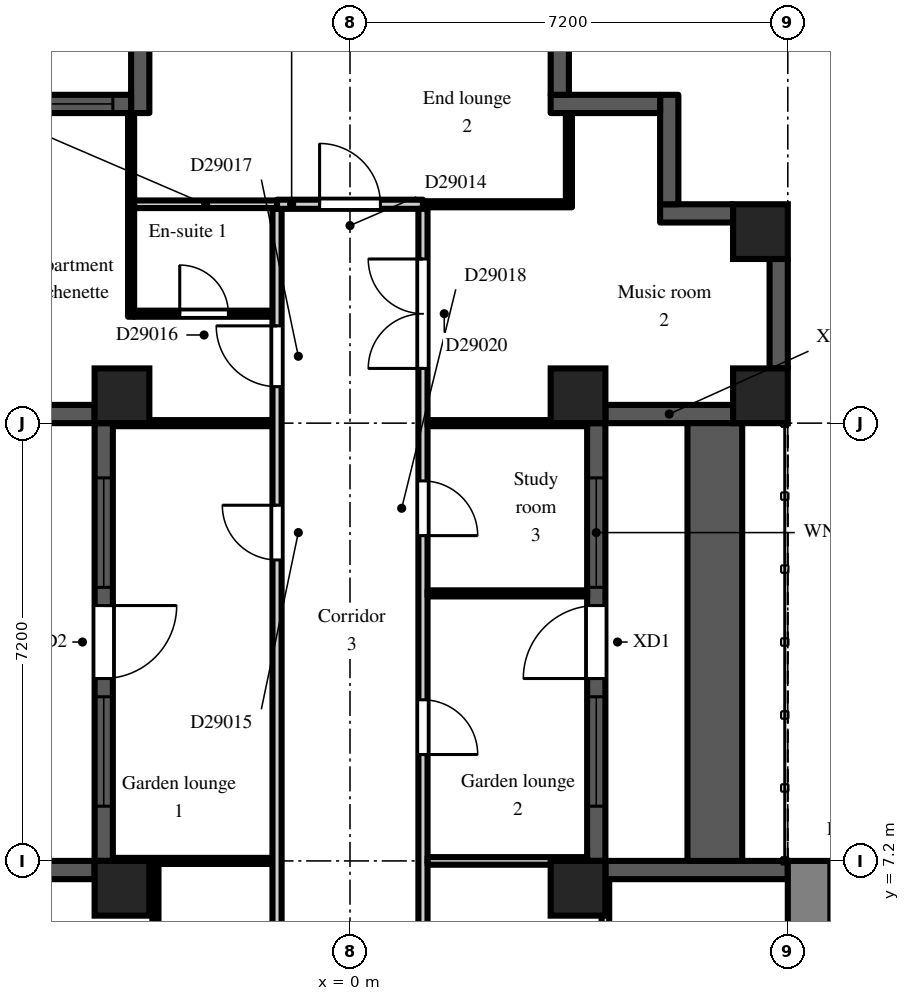
"""IFC4 building model, lengths in metres.
Left out: names, types, materials, properties, quantities, classifications, styles, units other than length and angle.
Written with IfcOpenShell. Run it as: python <this file> out.ifc"""

import sys

from ifc_helpers import new_model, si_unit, direction, frame, frame_2d, origin, origin_2d, place, context, subcontext, project, spatial, rectangle, extrude, element, fill, save


model = new_model("IFC4")
c1 = context("Model", 3, precision=1e-05, world=origin(), true_north=direction((0.0, 1.0)))
c2 = subcontext(c1, "Body", "Model", "MODEL_VIEW")
j1 = project(units=[si_unit("LENGTHUNIT", "METRE"), si_unit("PLANEANGLEUNIT", "RADIAN")], contexts=[c1])
p1 = place(None, origin())
s1 = spatial("IfcSite", under=j1, at=p1, CompositionType="ELEMENT")
p2 = place(p1, origin())
s2 = spatial("IfcBuilding", under=s1, at=p2, CompositionType="ELEMENT")
p3 = place(p2, frame((0.0, 0.0, 201.9)))
s3 = spatial("IfcBuildingStorey", under=s2, at=p3, CompositionType="ELEMENT", Elevation=201.9)
for number, where, z_axis, x_axis in (
    (1, (-3.75, 6.75, 0.0), (0.0, 0.0, 1.0), (1.0, 0.0, 0.0)),
    (2, (-3.75, 14.85, 0.0), (0.0, 0.0, 1.0), (1.0, 0.0, 0.0)),
    (3, (3.75, 6.75, 0.0), (0.0, 0.0, 1.0), (1.0, 0.0, 0.0)),
    (4, (3.75, 14.85, 0.0), (0.0, 0.0, 1.0), (1.0, 0.0, 0.0)),
    (5, (6.75, 14.85, 0.0), (0.0, 0.0, 1.0), (1.0, 0.0, 0.0)),
    (6, (6.75, 17.55, 0.0), (0.0, 0.0, 1.0), (1.0, 0.0, 0.0)),
):
    element("IfcColumn", number, at=place(p3, frame(where, z_axis=z_axis, x_axis=x_axis)), inside=s3, PredefinedType="COLUMN", context=c2, shape_type="SweptSolid", body=[
        extrude(rectangle(XDim=0.9, YDim=0.9, at=origin_2d()), origin(), (0.0, 0.0, 1.0), 3.0),
    ])
p4 = place(p3, frame((7.2, 7.05, 0.0), z_axis=(0.0, 0.0, 1.0), x_axis=(-1.0, 0.0, 0.0)))
e7 = element("IfcWall", 7, at=p4, inside=s3, PredefinedType="SOLIDWALL", context=c2, shape_type="SweptSolid", body=[
    extrude(rectangle(XDim=3.0, YDim=0.3, at=frame_2d((1.5, 0.0))), origin(), (0.0, 0.0, 1.0), 2.3),
])
p5 = place(p3, frame((4.05, 7.2, 0.0), z_axis=(0.0, 0.0, 1.0), x_axis=(0.0, 1.0, 0.0)))
e8 = element("IfcWall", 8, at=p5, inside=s3, PredefinedType="SOLIDWALL", context=c2, shape_type="SweptSolid", body=[
    extrude(rectangle(XDim=7.2, YDim=0.3, at=frame_2d((3.6, 0.0))), origin(), (0.0, 0.0, 1.0), 2.3),
])
p6 = place(p5, frame((3.0, 0.0, 0.0)))
e9 = element("IfcOpeningElement", 9, at=p6, cuts=e8, PredefinedType="OPENING", context=c2, shape_type="SweptSolid", body=[
    extrude(rectangle(XDim=1.2, YDim=2.05, at=frame_2d((0.6, 1.025))), frame((0.0, 0.16, 0.0), z_axis=(0.0, -1.0, 0.0), x_axis=(1.0, 0.0, 0.0)), (0.0, 0.0, 1.0), 0.32),
])
p7 = place(p5, frame((0.9, 0.0, 0.2)))
e10 = element("IfcOpeningElement", 10, at=p7, cuts=e8, PredefinedType="OPENING", context=c2, shape_type="SweptSolid", body=[
    extrude(rectangle(XDim=1.8, YDim=1.85, at=frame_2d((0.9, 0.925))), frame((0.0, 0.16, 0.0), z_axis=(0.0, -1.0, 0.0), x_axis=(1.0, 0.0, 0.0)), (0.0, 0.0, 1.0), 0.32),
])
p8 = place(p5, frame((4.5, 0.0, 0.2)))
e11 = element("IfcOpeningElement", 11, at=p8, cuts=e8, PredefinedType="OPENING", context=c2, shape_type="SweptSolid", body=[
    extrude(rectangle(XDim=1.8, YDim=1.85, at=frame_2d((0.9, 0.925))), frame((0.0, 0.16, 0.0), z_axis=(0.0, -1.0, 0.0), x_axis=(1.0, 0.0, 0.0)), (0.0, 0.0, 1.0), 0.32),
])
p9 = place(p3, frame((4.2, 14.55, 0.0), z_axis=(0.0, 0.0, 1.0), x_axis=(1.0, 0.0, 0.0)))
e12 = element("IfcWall", 12, at=p9, inside=s3, PredefinedType="SOLIDWALL", context=c2, shape_type="SweptSolid", body=[
    extrude(rectangle(XDim=2.1, YDim=0.3, at=frame_2d((1.05, 0.0))), origin(), (0.0, 0.0, 1.0), 2.3),
])
p10 = place(p3, frame((7.05, 15.3, 0.0), z_axis=(0.0, 0.0, 1.0), x_axis=(0.0, 1.0, 0.0)))
e13 = element("IfcWall", 13, at=p10, inside=s3, PredefinedType="SOLIDWALL", context=c2, shape_type="SweptSolid", body=[
    extrude(rectangle(XDim=1.8, YDim=0.3, at=frame_2d((0.9, 0.0))), origin(), (0.0, 0.0, 1.0), 2.3),
])
p11 = place(p3, frame((6.3, 17.85, 0.0), z_axis=(0.0, 0.0, 1.0), x_axis=(-1.0, 0.0, 0.0)))
e14 = element("IfcWall", 14, at=p11, inside=s3, PredefinedType="SOLIDWALL", context=c2, shape_type="SweptSolid", body=[
    extrude(rectangle(XDim=1.2, YDim=0.3, at=frame_2d((0.6, 0.0))), origin(), (0.0, 0.0, 1.0), 2.6),
])
for number, where, z_axis, x_axis in (
    (15, (5.25, 18.0, 0.0), (0.0, 0.0, 1.0), (0.0, 1.0, 0.0)),
    (16, (5.1, 19.65, 0.0), (0.0, 0.0, 1.0), (-1.0, 0.0, 0.0)),
):
    element("IfcWall", number, at=place(p3, frame(where, z_axis=z_axis, x_axis=x_axis)), inside=s3, PredefinedType="SOLIDWALL", context=c2, shape_type="SweptSolid", body=[
        extrude(rectangle(XDim=1.8, YDim=0.3, at=frame_2d((0.9, 0.0))), origin(), (0.0, 0.0, 1.0), 2.6),
    ])
p12 = place(p3, frame((3.45, 19.8, 0.0), z_axis=(0.0, 0.0, 1.0), x_axis=(0.0, 1.0, 0.0)))
e17 = element("IfcWall", 17, at=p12, inside=s3, PredefinedType="SOLIDWALL", context=c2, shape_type="SweptSolid", body=[
    extrude(rectangle(XDim=0.9, YDim=0.3, at=frame_2d((0.45, 0.0))), origin(), (0.0, 0.0, 1.0), 2.6),
])
p13 = place(p3, frame((-3.45, 20.7, 0.0), z_axis=(0.0, 0.0, 1.0), x_axis=(0.0, -1.0, 0.0)))
e18 = element("IfcWall", 18, at=p13, inside=s3, PredefinedType="SOLIDWALL", context=c2, shape_type="SweptSolid", body=[
    extrude(rectangle(XDim=1.2, YDim=0.3, at=frame_2d((0.6, 0.0))), origin(), (0.0, 0.0, 1.0), 2.6),
])
p14 = place(p3, frame((-3.6, 19.65, 0.0), z_axis=(0.0, 0.0, 1.0), x_axis=(-1.0, 0.0, 0.0)))
e19 = element("IfcWall", 19, at=p14, inside=s3, PredefinedType="SOLIDWALL", context=c2, shape_type="SweptSolid", body=[
    extrude(rectangle(XDim=1.8, YDim=0.3, at=frame_2d((0.9, 0.0))), origin(), (0.0, 0.0, 1.0), 2.6),
])
p15 = place(p14, frame((0.3, 0.0, 0.2)))
e20 = element("IfcOpeningElement", 20, at=p15, cuts=e19, PredefinedType="OPENING", context=c2, shape_type="SweptSolid", body=[
    extrude(rectangle(XDim=1.2, YDim=1.85, at=frame_2d((0.6, 0.925))), frame((0.0, 0.16, 0.0), z_axis=(0.0, -1.0, 0.0), x_axis=(1.0, 0.0, 0.0)), (0.0, 0.0, 1.0), 0.32),
])
p16 = place(p3, frame((-6.3, 14.55, 0.0), z_axis=(0.0, 0.0, 1.0), x_axis=(1.0, 0.0, 0.0)))
e21 = element("IfcWall", 21, at=p16, inside=s3, PredefinedType="SOLIDWALL", context=c2, shape_type="SweptSolid", body=[
    extrude(rectangle(XDim=2.1, YDim=0.3, at=frame_2d((1.05, 0.0))), origin(), (0.0, 0.0, 1.0), 2.3),
])
p17 = place(p3, frame((-4.05, 14.4, 0.0), z_axis=(0.0, 0.0, 1.0), x_axis=(0.0, -1.0, 0.0)))
e22 = element("IfcWall", 22, at=p17, inside=s3, PredefinedType="SOLIDWALL", context=c2, shape_type="SweptSolid", body=[
    extrude(rectangle(XDim=7.2, YDim=0.3, at=frame_2d((3.6, 0.0))), origin(), (0.0, 0.0, 1.0), 2.3),
])
p18 = place(p17, frame((3.0, 0.0, 0.0)))
e23 = element("IfcOpeningElement", 23, at=p18, cuts=e22, PredefinedType="OPENING", context=c2, shape_type="SweptSolid", body=[
    extrude(rectangle(XDim=1.2, YDim=2.05, at=frame_2d((0.6, 1.025))), frame((0.0, 0.16, 0.0), z_axis=(0.0, -1.0, 0.0), x_axis=(1.0, 0.0, 0.0)), (0.0, 0.0, 1.0), 0.32),
])
p19 = place(p17, frame((0.9, 0.0, 0.2)))
e24 = element("IfcOpeningElement", 24, at=p19, cuts=e22, PredefinedType="OPENING", context=c2, shape_type="SweptSolid", body=[
    extrude(rectangle(XDim=1.8, YDim=1.85, at=frame_2d((0.9, 0.925))), frame((0.0, 0.16, 0.0), z_axis=(0.0, -1.0, 0.0), x_axis=(1.0, 0.0, 0.0)), (0.0, 0.0, 1.0), 0.32),
])
p20 = place(p17, frame((4.5, 0.0, 0.2)))
e25 = element("IfcOpeningElement", 25, at=p20, cuts=e22, PredefinedType="OPENING", context=c2, shape_type="SweptSolid", body=[
    extrude(rectangle(XDim=1.8, YDim=1.85, at=frame_2d((0.9, 0.925))), frame((0.0, 0.16, 0.0), z_axis=(0.0, -1.0, 0.0), x_axis=(1.0, 0.0, 0.0)), (0.0, 0.0, 1.0), 0.32),
])
p21 = place(p3, frame((-4.2, 7.05, 0.0), z_axis=(0.0, 0.0, 1.0), x_axis=(-1.0, 0.0, 0.0)))
e26 = element("IfcWall", 26, at=p21, inside=s3, PredefinedType="SOLIDWALL", context=c2, shape_type="SweptSolid", body=[
    extrude(rectangle(XDim=3.0, YDim=0.3, at=frame_2d((1.5, 0.0))), origin(), (0.0, 0.0, 1.0), 2.3),
])
p22 = place(p3, frame((6.0, 7.2, 0.0), z_axis=(0.0, 0.0, 1.0), x_axis=(0.0, 1.0, 0.0)))
e27 = element("IfcWall", 27, at=p22, inside=s3, PredefinedType="PARAPET", context=c2, shape_type="SweptSolid", body=[
    extrude(rectangle(XDim=7.2, YDim=0.9, at=frame_2d((3.6, 0.0))), origin(), (0.0, 0.0, 1.0), 0.8),
])
p23 = place(p3, frame((7.55, -7.2, 0.0), z_axis=(0.0, 0.0, 1.0), x_axis=(0.0, 1.0, 0.0)))
e28 = element("IfcWall", 28, at=p23, inside=s3, PredefinedType="SHEAR", context=c2, shape_type="SweptSolid", body=[
    extrude(rectangle(XDim=14.4, YDim=0.7, at=frame_2d((7.2, 0.0))), origin(), (0.0, 0.0, 1.0), 2.6),
])
p24 = place(p23, frame((6.0, 0.0, 0.0)))
e29 = element("IfcOpeningElement", 29, at=p24, cuts=e28, PredefinedType="OPENING", context=c2, shape_type="SweptSolid", body=[
    extrude(rectangle(XDim=2.4, YDim=2.2, at=frame_2d((1.2, 1.1))), frame((0.0, 0.36, 0.0), z_axis=(0.0, -1.0, 0.0), x_axis=(1.0, 0.0, 0.0)), (0.0, 0.0, 1.0), 0.72),
])
for number, where, z_axis, x_axis in (
    (30, (-3.9, 7.2, 0.0), (0.0, 0.0, 1.0), (1.0, 0.0, 0.0)),
    (31, (-3.9, 14.4, 0.0), (0.0, 0.0, 1.0), (1.0, 0.0, 0.0)),
):
    element("IfcWall", number, at=place(p3, frame(where, z_axis=z_axis, x_axis=x_axis)), inside=s3, PredefinedType="PARTITIONING", context=c2, shape_type="SweptSolid", body=[
        extrude(rectangle(XDim=2.625, YDim=0.1, at=frame_2d((1.312, 0.0))), origin(), (0.0, 0.0, 1.0), 2.6),
    ])
p25 = place(p3, frame((-3.6, 16.15, 0.0), z_axis=(0.0, 0.0, 1.0), x_axis=(0.0, 1.0, 0.0)))
e32 = element("IfcWall", 32, at=p25, inside=s3, PredefinedType="PARTITIONING", context=c2, shape_type="SweptSolid", body=[
    extrude(rectangle(XDim=3.35, YDim=0.1, at=frame_2d((1.675, 0.0))), origin(), (0.0, 0.0, 1.0), 2.6),
])
p26 = place(p3, frame((-3.55, 16.2, 0.0), z_axis=(0.0, 0.0, 1.0), x_axis=(1.0, 0.0, 0.0)))
e33 = element("IfcWall", 33, at=p26, inside=s3, PredefinedType="PARTITIONING", context=c2, shape_type="SweptSolid", body=[
    extrude(rectangle(XDim=2.275, YDim=0.1, at=frame_2d((1.138, 0.0))), origin(), (0.0, 0.0, 1.0), 2.6),
])
p27 = place(p26, frame((0.75, 0.0, 0.0)))
e34 = element("IfcOpeningElement", 34, at=p27, cuts=e33, PredefinedType="OPENING", context=c2, shape_type="SweptSolid", body=[
    extrude(rectangle(XDim=0.8, YDim=2.1, at=frame_2d((0.4, 1.05))), frame((0.0, 0.06, 0.0), z_axis=(0.0, -1.0, 0.0), x_axis=(1.0, 0.0, 0.0)), (0.0, 0.0, 1.0), 0.12),
])
p28 = place(p3, frame((-3.55, 18.0, 0.0), z_axis=(0.0, 0.0, 1.0), x_axis=(1.0, 0.0, 0.0)))
e35 = element("IfcWall", 35, at=p28, inside=s3, PredefinedType="PARTITIONING", context=c2, shape_type="SweptSolid", body=[
    extrude(rectangle(XDim=2.35, YDim=0.125, at=frame_2d((1.175, 0.0))), origin(), (0.0, 0.0, 1.0), 2.6),
])
p29 = place(p3, frame((-3.2, 1.275, 0.0), z_axis=(0.0, 0.0, 1.0), x_axis=(0.0, 1.0, 0.0)))
e36 = element("IfcWall", 36, at=p29, inside=s3, PredefinedType="PARTITIONING", context=c2, shape_type="SweptSolid", body=[
    extrude(rectangle(XDim=5.875, YDim=0.1, at=frame_2d((2.938, 0.0))), origin(), (0.0, 0.0, 1.0), 2.6),
])
p30 = place(p3, frame((-1.2, 1.275, 0.0), z_axis=(0.0, 0.0, 1.0), x_axis=(0.0, 1.0, 0.0)))
e37 = element("IfcWall", 37, at=p30, inside=s3, PredefinedType="PARTITIONING", context=c2, shape_type="SweptSolid", body=[
    extrude(rectangle(XDim=16.65, YDim=0.15, at=frame_2d((8.325, 0.0))), origin(), (0.0, 0.0, 1.0), 2.6),
])
p31 = place(p30, frame((2.475, 0.0, 0.0)))
e38 = element("IfcOpeningElement", 38, at=p31, cuts=e37, PredefinedType="OPENING", context=c2, shape_type="SweptSolid", body=[
    extrude(rectangle(XDim=0.9, YDim=2.1, at=frame_2d((0.45, 1.05))), frame((0.0, 0.085, 0.0), z_axis=(0.0, -1.0, 0.0), x_axis=(1.0, 0.0, 0.0)), (0.0, 0.0, 1.0), 0.17),
])
p32 = place(p30, frame((10.875, 0.0, 0.0)))
e39 = element("IfcOpeningElement", 39, at=p32, cuts=e37, PredefinedType="OPENING", context=c2, shape_type="SweptSolid", body=[
    extrude(rectangle(XDim=0.9, YDim=2.1, at=frame_2d((0.45, 1.05))), frame((0.0, 0.085, 0.0), z_axis=(0.0, -1.0, 0.0), x_axis=(1.0, 0.0, 0.0)), (0.0, 0.0, 1.0), 0.17),
])
p33 = place(p30, frame((13.725, 0.0, 0.0)))
e40 = element("IfcOpeningElement", 40, at=p33, cuts=e37, PredefinedType="OPENING", context=c2, shape_type="SweptSolid", body=[
    extrude(rectangle(XDim=1.0, YDim=2.1, at=frame_2d((0.5, 1.05))), frame((0.0, 0.085, 0.0), z_axis=(0.0, -1.0, 0.0), x_axis=(1.0, 0.0, 0.0)), (0.0, 0.0, 1.0), 0.17),
])
p34 = place(p3, frame((-1.2, 18.0, 0.0), z_axis=(0.0, 0.0, 1.0), x_axis=(1.0, 0.0, 0.0)))
e41 = element("IfcWall", 41, at=p34, inside=s3, PredefinedType="PARTITIONING", context=c2, shape_type="SweptSolid", body=[
    extrude(rectangle(XDim=2.4, YDim=0.15, at=frame_2d((1.2, 0.0))), origin(), (0.0, 0.0, 1.0), 2.6),
])
p35 = place(p34, frame((0.7, 0.0, 0.0)))
e42 = element("IfcOpeningElement", 42, at=p35, cuts=e41, PredefinedType="OPENING", context=c2, shape_type="SweptSolid", body=[
    extrude(rectangle(XDim=1.0, YDim=2.1, at=frame_2d((0.5, 1.05))), frame((0.0, 0.085, 0.0), z_axis=(0.0, -1.0, 0.0), x_axis=(1.0, 0.0, 0.0)), (0.0, 0.0, 1.0), 0.17),
])
p36 = place(p3, frame((1.2, 1.125, 0.0), z_axis=(0.0, 0.0, 1.0), x_axis=(0.0, 1.0, 0.0)))
e43 = element("IfcWall", 43, at=p36, inside=s3, PredefinedType="PARTITIONING", context=c2, shape_type="SweptSolid", body=[
    extrude(rectangle(XDim=16.8, YDim=0.15, at=frame_2d((8.4, 0.0))), origin(), (0.0, 0.0, 1.0), 2.6),
])
p37 = place(p36, frame((2.625, 0.0, 0.0)))
e44 = element("IfcOpeningElement", 44, at=p37, cuts=e43, PredefinedType="OPENING", context=c2, shape_type="SweptSolid", body=[
    extrude(rectangle(XDim=0.9, YDim=2.1, at=frame_2d((0.45, 1.05))), frame((0.0, 0.085, 0.0), z_axis=(0.0, -1.0, 0.0), x_axis=(1.0, 0.0, 0.0)), (0.0, 0.0, 1.0), 0.17),
])
p38 = place(p36, frame((11.425, 0.0, 0.0)))
e45 = element("IfcOpeningElement", 45, at=p38, cuts=e43, PredefinedType="OPENING", context=c2, shape_type="SweptSolid", body=[
    extrude(rectangle(XDim=0.9, YDim=2.1, at=frame_2d((0.45, 1.05))), frame((0.0, 0.085, 0.0), z_axis=(0.0, -1.0, 0.0), x_axis=(1.0, 0.0, 0.0)), (0.0, 0.0, 1.0), 0.17),
])
p39 = place(p36, frame((7.825, 0.0, 0.0)))
e46 = element("IfcOpeningElement", 46, at=p39, cuts=e43, PredefinedType="OPENING", context=c2, shape_type="SweptSolid", body=[
    extrude(rectangle(XDim=0.9, YDim=2.1, at=frame_2d((0.45, 1.05))), frame((0.0, 0.085, 0.0), z_axis=(0.0, -1.0, 0.0), x_axis=(1.0, 0.0, 0.0)), (0.0, 0.0, 1.0), 0.17),
])
p40 = place(p36, frame((14.175, 0.0, 0.0)))
e47 = element("IfcOpeningElement", 47, at=p40, cuts=e43, PredefinedType="OPENING", context=c2, shape_type="SweptSolid", body=[
    extrude(rectangle(XDim=1.8, YDim=2.1, at=frame_2d((0.9, 1.05))), frame((0.0, 0.085, 0.0), z_axis=(0.0, -1.0, 0.0), x_axis=(1.0, 0.0, 0.0)), (0.0, 0.0, 1.0), 0.17),
])
p41 = place(p3, frame((1.275, 7.2, 0.0), z_axis=(0.0, 0.0, 1.0), x_axis=(1.0, 0.0, 0.0)))
e48 = element("IfcWall", 48, at=p41, inside=s3, PredefinedType="PARTITIONING", context=c2, shape_type="SweptSolid", body=[
    extrude(rectangle(XDim=2.625, YDim=0.125, at=frame_2d((1.312, 0.0))), origin(), (0.0, 0.0, 1.0), 2.6),
])
for number, where, z_axis, x_axis in (
    (49, (1.275, 11.6, 0.0), (0.0, 0.0, 1.0), (1.0, 0.0, 0.0)),
    (50, (1.275, 14.4, 0.0), (0.0, 0.0, 1.0), (1.0, 0.0, 0.0)),
):
    element("IfcWall", number, at=place(p3, frame(where, z_axis=z_axis, x_axis=x_axis)), inside=s3, PredefinedType="PARTITIONING", context=c2, shape_type="SweptSolid", body=[
        extrude(rectangle(XDim=2.625, YDim=0.1, at=frame_2d((1.312, 0.0))), origin(), (0.0, 0.0, 1.0), 2.6),
    ])
p42 = place(p3, frame((1.2, 18.0, 0.0), z_axis=(0.0, 0.0, 1.0), x_axis=(1.0, 0.0, 0.0)))
e51 = element("IfcWall", 51, at=p42, inside=s3, PredefinedType="PARTITIONING", context=c2, shape_type="SweptSolid", body=[
    extrude(rectangle(XDim=2.45, YDim=0.1, at=frame_2d((1.225, 0.0))), origin(), (0.0, 0.0, 1.0), 2.6),
])
p43 = place(p3, frame((3.6, 18.05, 0.0), z_axis=(0.0, 0.0, 1.0), x_axis=(0.0, 1.0, 0.0)))
e52 = element("IfcWall", 52, at=p43, inside=s3, PredefinedType="PARTITIONING", context=c2, shape_type="SweptSolid", body=[
    extrude(rectangle(XDim=1.45, YDim=0.1, at=frame_2d((0.725, 0.0))), origin(), (0.0, 0.0, 1.0), 2.6),
])
p44 = place(p3, frame((4.2, 1.275, 0.0), z_axis=(0.0, 0.0, 1.0), x_axis=(0.0, 1.0, 0.0)))
e53 = element("IfcWall", 53, at=p44, inside=s3, PredefinedType="PARTITIONING", context=c2, shape_type="SweptSolid", body=[
    extrude(rectangle(XDim=5.625, YDim=0.125, at=frame_2d((2.812, 0.0))), origin(), (0.0, 0.0, 1.0), 2.6),
])
p45 = place(p6, origin())
e54 = element("IfcDoor", 54, at=p45, inside=s3, OperationType="SINGLE_SWING_LEFT", PredefinedType="DOOR", context=c2, shape_type="SweptSolid", body=[
    extrude(rectangle(XDim=1.2, YDim=2.05, at=frame_2d((0.6, 1.025))), frame((0.0, 0.025, 0.0), z_axis=(0.0, -1.0, 0.0), x_axis=(1.0, 0.0, 0.0)), (0.0, 0.0, 1.0), 0.05),
])
fill(e9, e54)
p46 = place(p7, origin())
e55 = element("IfcWindow", 55, at=p46, inside=s3, PartitioningType="SINGLE_PANEL", PredefinedType="WINDOW", context=c2, shape_type="SweptSolid", body=[
    extrude(rectangle(XDim=1.8, YDim=1.85, at=frame_2d((0.9, 0.925))), frame((0.0, 0.03, 0.0), z_axis=(0.0, -1.0, 0.0), x_axis=(1.0, 0.0, 0.0)), (0.0, 0.0, 1.0), 0.06),
])
fill(e10, e55)
p47 = place(p8, origin())
e56 = element("IfcWindow", 56, at=p47, inside=s3, PartitioningType="SINGLE_PANEL", PredefinedType="WINDOW", context=c2, shape_type="SweptSolid", body=[
    extrude(rectangle(XDim=1.8, YDim=1.85, at=frame_2d((0.9, 0.925))), frame((0.0, 0.03, 0.0), z_axis=(0.0, -1.0, 0.0), x_axis=(1.0, 0.0, 0.0)), (0.0, 0.0, 1.0), 0.06),
])
fill(e11, e56)
p48 = place(p15, origin())
e57 = element("IfcWindow", 57, at=p48, inside=s3, PartitioningType="SINGLE_PANEL", PredefinedType="WINDOW", context=c2, shape_type="SweptSolid", body=[
    extrude(rectangle(XDim=1.2, YDim=1.85, at=frame_2d((0.6, 0.925))), frame((0.0, 0.03, 0.0), z_axis=(0.0, -1.0, 0.0), x_axis=(1.0, 0.0, 0.0)), (0.0, 0.0, 1.0), 0.06),
])
fill(e20, e57)
p49 = place(p18, origin())
e58 = element("IfcDoor", 58, at=p49, inside=s3, OperationType="SINGLE_SWING_LEFT", PredefinedType="DOOR", context=c2, shape_type="SweptSolid", body=[
    extrude(rectangle(XDim=1.2, YDim=2.05, at=frame_2d((0.6, 1.025))), frame((0.0, 0.025, 0.0), z_axis=(0.0, -1.0, 0.0), x_axis=(1.0, 0.0, 0.0)), (0.0, 0.0, 1.0), 0.05),
])
fill(e23, e58)
p50 = place(p19, origin())
e59 = element("IfcWindow", 59, at=p50, inside=s3, PartitioningType="SINGLE_PANEL", PredefinedType="WINDOW", context=c2, shape_type="SweptSolid", body=[
    extrude(rectangle(XDim=1.8, YDim=1.85, at=frame_2d((0.9, 0.925))), frame((0.0, 0.03, 0.0), z_axis=(0.0, -1.0, 0.0), x_axis=(1.0, 0.0, 0.0)), (0.0, 0.0, 1.0), 0.06),
])
fill(e24, e59)
p51 = place(p20, origin())
e60 = element("IfcWindow", 60, at=p51, inside=s3, PartitioningType="SINGLE_PANEL", PredefinedType="WINDOW", context=c2, shape_type="SweptSolid", body=[
    extrude(rectangle(XDim=1.8, YDim=1.85, at=frame_2d((0.9, 0.925))), frame((0.0, 0.03, 0.0), z_axis=(0.0, -1.0, 0.0), x_axis=(1.0, 0.0, 0.0)), (0.0, 0.0, 1.0), 0.06),
])
fill(e25, e60)
p52 = place(p35, origin())
e61 = element("IfcDoor", 61, at=p52, inside=s3, OperationType="SINGLE_SWING_LEFT", PredefinedType="DOOR", context=c2, shape_type="SweptSolid", body=[
    extrude(rectangle(XDim=1.0, YDim=2.1, at=frame_2d((0.5, 1.05))), frame((0.0, 0.025, 0.0), z_axis=(0.0, -1.0, 0.0), x_axis=(1.0, 0.0, 0.0)), (0.0, 0.0, 1.0), 0.05),
])
fill(e42, e61)
p53 = place(p32, origin())
e62 = element("IfcDoor", 62, at=p53, inside=s3, OperationType="SINGLE_SWING_RIGHT", PredefinedType="DOOR", context=c2, shape_type="SweptSolid", body=[
    extrude(rectangle(XDim=0.9, YDim=2.1, at=frame_2d((0.45, 1.05))), frame((0.0, 0.025, 0.0), z_axis=(0.0, -1.0, 0.0), x_axis=(1.0, 0.0, 0.0)), (0.0, 0.0, 1.0), 0.05),
])
fill(e39, e62)
p54 = place(p27, origin())
e63 = element("IfcDoor", 63, at=p54, inside=s3, OperationType="SINGLE_SWING_LEFT", PredefinedType="DOOR", context=c2, shape_type="SweptSolid", body=[
    extrude(rectangle(XDim=0.8, YDim=2.1, at=frame_2d((0.4, 1.05))), frame((0.0, 0.025, 0.0), z_axis=(0.0, -1.0, 0.0), x_axis=(1.0, 0.0, 0.0)), (0.0, 0.0, 1.0), 0.05),
])
fill(e34, e63)
p55 = place(p33, origin())
e64 = element("IfcDoor", 64, at=p55, inside=s3, OperationType="SINGLE_SWING_RIGHT", PredefinedType="DOOR", context=c2, shape_type="SweptSolid", body=[
    extrude(rectangle(XDim=1.0, YDim=2.1, at=frame_2d((0.5, 1.05))), frame((0.0, 0.025, 0.0), z_axis=(0.0, -1.0, 0.0), x_axis=(1.0, 0.0, 0.0)), (0.0, 0.0, 1.0), 0.05),
])
fill(e40, e64)
p56 = place(p38, frame((0.9, 0.0, 0.0), z_axis=(0.0, 0.0, 1.0), x_axis=(-1.0, 0.0, 0.0)))
e65 = element("IfcDoor", 65, at=p56, inside=s3, OperationType="SINGLE_SWING_RIGHT", PredefinedType="DOOR", context=c2, shape_type="SweptSolid", body=[
    extrude(rectangle(XDim=0.9, YDim=2.1, at=frame_2d((0.45, 1.05))), frame((0.0, 0.025, 0.0), z_axis=(0.0, -1.0, 0.0), x_axis=(1.0, 0.0, 0.0)), (0.0, 0.0, 1.0), 0.05),
])
fill(e45, e65)
p57 = place(p39, frame((0.9, 0.0, 0.0), z_axis=(0.0, 0.0, 1.0), x_axis=(-1.0, 0.0, 0.0)))
e66 = element("IfcDoor", 66, at=p57, inside=s3, OperationType="SINGLE_SWING_RIGHT", PredefinedType="DOOR", context=c2, shape_type="SweptSolid", body=[
    extrude(rectangle(XDim=0.9, YDim=2.1, at=frame_2d((0.45, 1.05))), frame((0.0, 0.025, 0.0), z_axis=(0.0, -1.0, 0.0), x_axis=(1.0, 0.0, 0.0)), (0.0, 0.0, 1.0), 0.05),
])
fill(e46, e66)
p58 = place(p40, origin())
e67 = element("IfcDoor", 67, at=p58, inside=s3, OperationType="DOUBLE_DOOR_DOUBLE_SWING", PredefinedType="DOOR", context=c2, shape_type="SweptSolid", body=[
    extrude(rectangle(XDim=1.8, YDim=2.1, at=frame_2d((0.9, 1.05))), frame((0.0, 0.025, 0.0), z_axis=(0.0, -1.0, 0.0), x_axis=(1.0, 0.0, 0.0)), (0.0, 0.0, 1.0), 0.05),
])
fill(e47, e67)
save(model, sys.argv[1])
